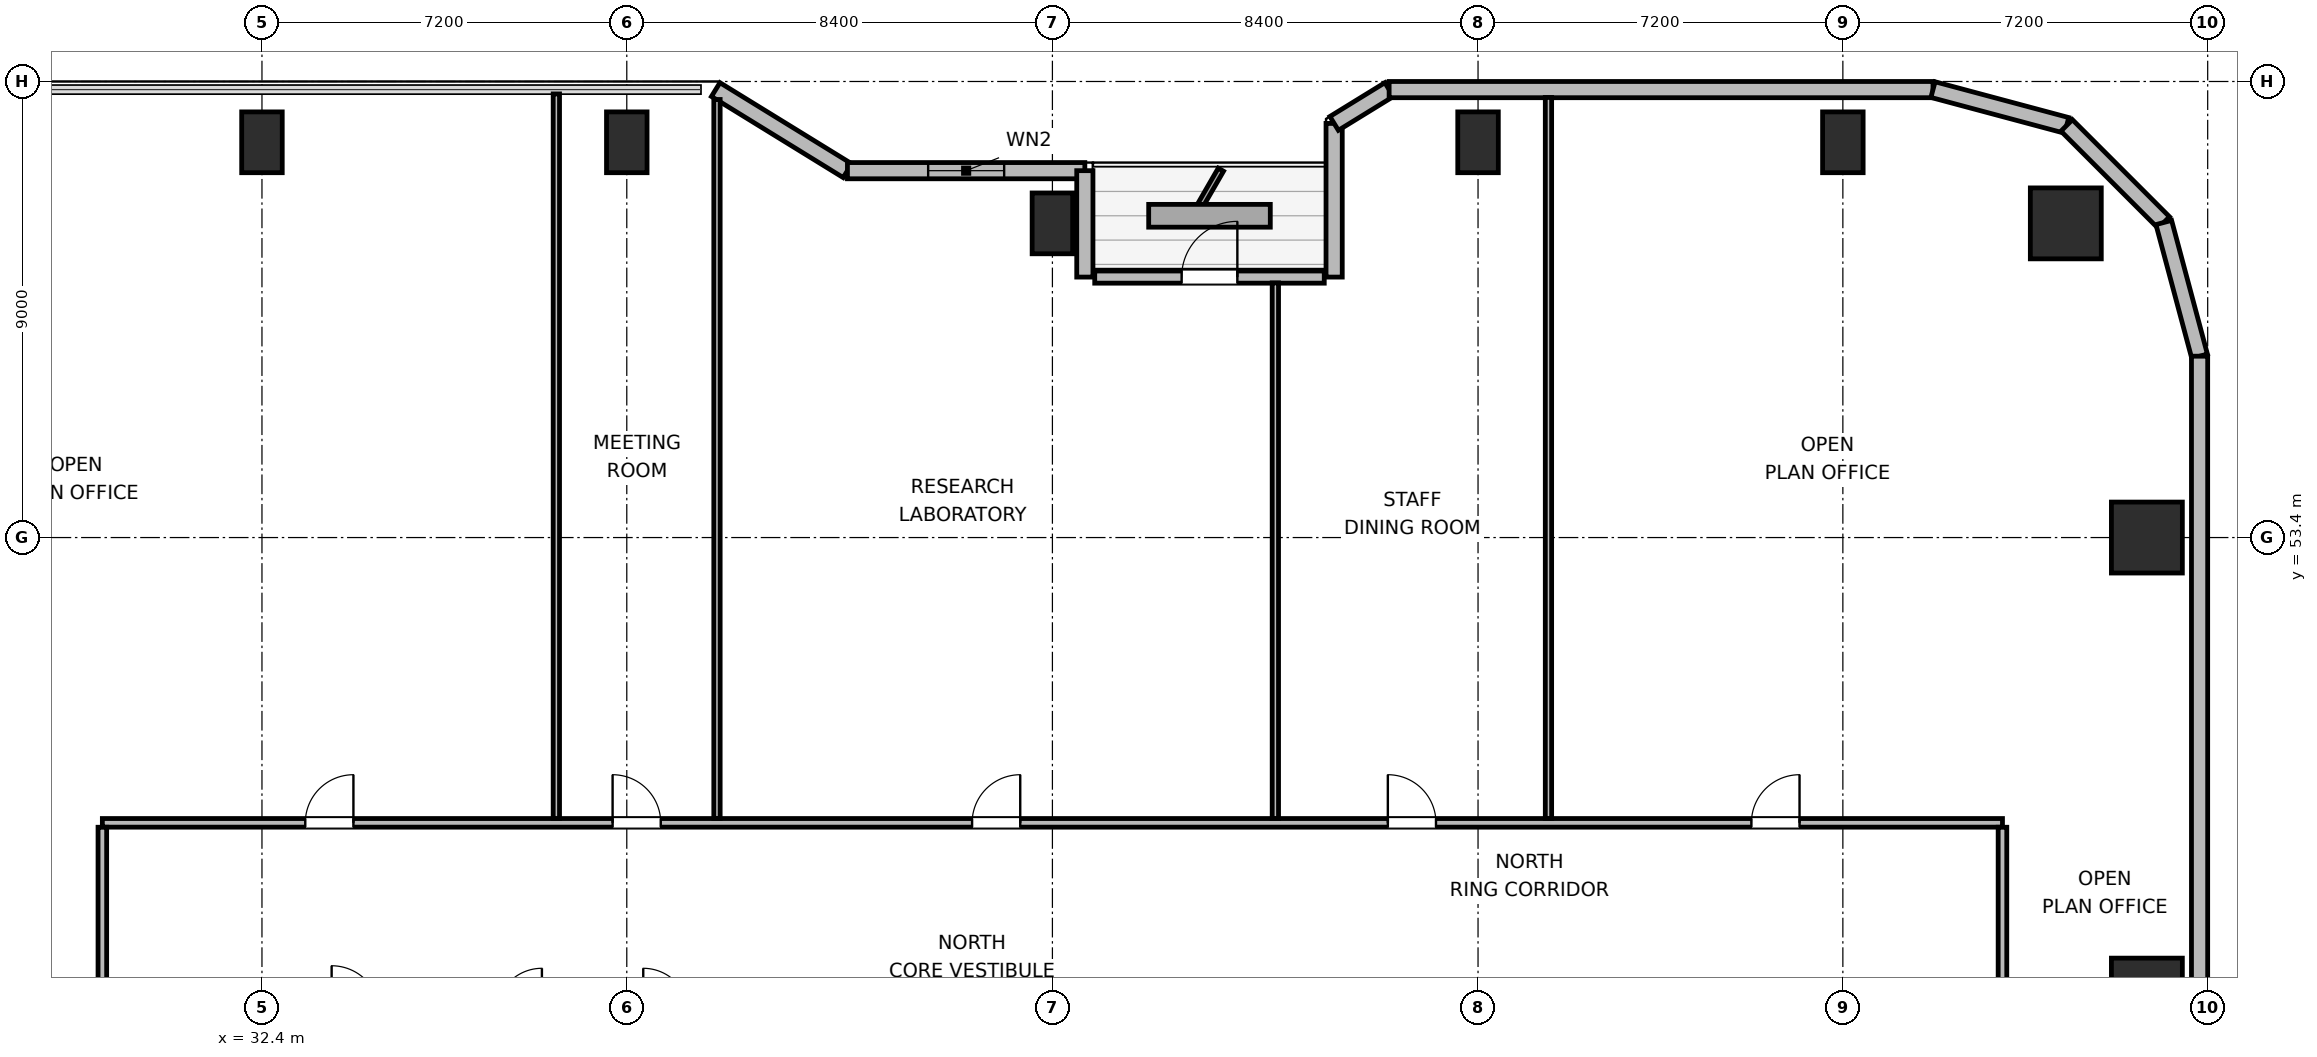
"""IFC4 building model, lengths in metres.
Left out: names, types, materials, properties, quantities, classifications, styles, units other than length and angle.
Written with IfcOpenShell. Run it as: python <this file> out.ifc"""

import sys

from ifc_helpers import new_model, si_unit, direction, frame, frame_2d, origin, origin_2d, place, context, subcontext, project, spatial, rectangle, circle, extrude, element, fill, save


model = new_model("IFC4")
c1 = context("Model", 3, precision=1e-05, world=origin(), true_north=direction((0.0, 1.0)))
c2 = subcontext(c1, "Body", "Model", "MODEL_VIEW")
j1 = project(units=[si_unit("LENGTHUNIT", "METRE"), si_unit("PLANEANGLEUNIT", "RADIAN")], contexts=[c1])
p1 = place(None, origin())
s1 = spatial("IfcSite", under=j1, at=p1, CompositionType="ELEMENT")
p2 = place(p1, origin())
s2 = spatial("IfcBuilding", under=s1, at=p2, CompositionType="ELEMENT")
p3 = place(p2, frame((0.0, 0.0, 93.6)))
s3 = spatial("IfcBuildingStorey", under=s2, at=p3, CompositionType="ELEMENT", Elevation=93.6)
p4 = place(p3, frame((68.0, 59.6, 0.0), z_axis=(0.0, 0.0, 1.0), x_axis=(1.0, 0.0, 0.0)))
e1 = element("IfcColumn", 1, at=p4, inside=s3, PredefinedType="COLUMN", context=c2, shape_type="SweptSolid", body=[
    extrude(circle(Radius=0.7, at=origin_2d()), origin(), (0.0, 0.0, 1.0), 3.9),
])
for number, where, z_axis, x_axis in (
    (2, (32.4, 61.2, 0.0), (0.0, 0.0, 1.0), (1.0, 0.0, 0.0)),
    (3, (39.6, 61.2, 0.0), (0.0, 0.0, 1.0), (1.0, 0.0, 0.0)),
    (4, (48.0, 59.6, 0.0), (0.0, 0.0, 1.0), (1.0, 0.0, 0.0)),
    (5, (56.4, 61.2, 0.0), (0.0, 0.0, 1.0), (1.0, 0.0, 0.0)),
    (6, (63.6, 61.2, 0.0), (0.0, 0.0, 1.0), (1.0, 0.0, 0.0)),
):
    element("IfcColumn", number, at=place(p3, frame(where, z_axis=z_axis, x_axis=x_axis)), inside=s3, PredefinedType="COLUMN", context=c2, shape_type="SweptSolid", body=[
        extrude(rectangle(XDim=0.8, YDim=1.2, at=origin_2d()), origin(), (0.0, 0.0, 1.0), 3.9),
    ])
for number, where, z_axis, x_axis in (
    (7, (69.6, 44.4, 0.0), (0.0, 0.0, 1.0), (1.0, 0.0, 0.0)),
    (8, (69.6, 53.4, 0.0), (0.0, 0.0, 1.0), (1.0, 0.0, 0.0)),
):
    element("IfcColumn", number, at=place(p3, frame(where, z_axis=z_axis, x_axis=x_axis)), inside=s3, PredefinedType="COLUMN", context=c2, shape_type="SweptSolid", body=[
        extrude(rectangle(XDim=1.4, YDim=1.4, at=origin_2d()), origin(), (0.0, 0.0, 1.0), 3.9),
    ])
p5 = place(p3, frame((41.355, 62.24, 0.0), z_axis=(0.0, 0.0, 1.0), x_axis=(0.851630857047, -0.524142044989, 0.0)))
e9 = element("IfcWall", 9, at=p5, inside=s3, PredefinedType="SOLIDWALL", context=c2, shape_type="SweptSolid", body=[
    extrude(rectangle(XDim=3.053, YDim=0.32, at=frame_2d((1.526, 0.0))), origin(), (0.0, 0.0, 1.0), 2.875),
])
p6 = place(p3, frame((43.955, 60.64, 0.0), z_axis=(0.0, 0.0, 1.0), x_axis=(1.0, 0.0, 0.0)))
e10 = element("IfcWall", 10, at=p6, inside=s3, PredefinedType="SOLIDWALL", context=c2, shape_type="SweptSolid", body=[
    extrude(rectangle(XDim=4.685, YDim=0.32, at=frame_2d((2.343, 0.0))), origin(), (0.0, 0.0, 1.0), 2.875),
])
p7 = place(p6, frame((1.593, 0.0, 0.85)))
e11 = element("IfcOpeningElement", 11, at=p7, cuts=e10, PredefinedType="OPENING", context=c2, shape_type="SweptSolid", body=[
    extrude(rectangle(XDim=1.5, YDim=1.1, at=frame_2d((0.75, 0.55))), frame((0.0, 0.17, 0.0), z_axis=(0.0, -1.0, 0.0), x_axis=(1.0, 0.0, 0.0)), (0.0, 0.0, 1.0), 0.34),
])
p8 = place(p3, frame((48.64, 60.64, 0.0), z_axis=(0.0, 0.0, 1.0), x_axis=(0.0, -1.0, 0.0)))
e12 = element("IfcWall", 12, at=p8, inside=s3, PredefinedType="SOLIDWALL", context=c2, shape_type="SweptSolid", body=[
    extrude(rectangle(XDim=2.1, YDim=0.32, at=frame_2d((1.05, 0.0))), origin(), (0.0, 0.0, 1.0), 2.875),
])
p9 = place(p3, frame((48.835, 58.54, 0.0), z_axis=(0.0, 0.0, 1.0), x_axis=(1.0, 0.0, 0.0)))
e13 = element("IfcWall", 13, at=p9, inside=s3, PredefinedType="SOLIDWALL", context=c2, shape_type="SweptSolid", body=[
    extrude(rectangle(XDim=4.53, YDim=0.24, at=frame_2d((2.265, 0.0))), origin(), (0.0, 0.0, 1.0), 3.64),
])
p10 = place(p9, frame((1.715, 0.0, 0.0)))
e14 = element("IfcOpeningElement", 14, at=p10, cuts=e13, PredefinedType="OPENING", context=c2, shape_type="SweptSolid", body=[
    extrude(rectangle(XDim=1.1, YDim=2.04, at=frame_2d((0.55, 1.02))), frame((0.0, 0.13, 0.0), z_axis=(0.0, -1.0, 0.0), x_axis=(1.0, 0.0, 0.0)), (0.0, 0.0, 1.0), 0.26),
])
p11 = place(p3, frame((53.56, 58.54, 0.0), z_axis=(0.0, 0.0, 1.0), x_axis=(0.0, 1.0, 0.0)))
e15 = element("IfcWall", 15, at=p11, inside=s3, PredefinedType="SOLIDWALL", context=c2, shape_type="SweptSolid", body=[
    extrude(rectangle(XDim=3.032, YDim=0.32, at=frame_2d((1.516, 0.0))), origin(), (0.0, 0.0, 1.0), 2.875),
])
p12 = place(p3, frame((53.56, 61.573, 0.0), z_axis=(0.0, 0.0, 1.0), x_axis=(0.851776724646, 0.523904964045, 0.0)))
e16 = element("IfcWall", 16, at=p12, inside=s3, PredefinedType="SOLIDWALL", context=c2, shape_type="SweptSolid", body=[
    extrude(rectangle(XDim=1.274, YDim=0.32, at=frame_2d((0.637, 0.0))), origin(), (0.0, 0.0, 1.0), 3.64),
])
p13 = place(p3, frame((54.645, 62.24, 0.0), z_axis=(0.0, 0.0, 1.0), x_axis=(1.0, 0.0, 0.0)))
e17 = element("IfcWall", 17, at=p13, inside=s3, PredefinedType="SOLIDWALL", context=c2, shape_type="SweptSolid", body=[
    extrude(rectangle(XDim=10.734, YDim=0.32, at=frame_2d((5.367, 0.0))), origin(), (0.0, 0.0, 1.0), 3.64),
])
p14 = place(p3, frame((65.379, 62.24, 0.0), z_axis=(0.0, 0.0, 1.0), x_axis=(0.965958423373, -0.25869736047, 0.0)))
e18 = element("IfcWall", 18, at=p14, inside=s3, PredefinedType="SOLIDWALL", context=c2, shape_type="SweptSolid", body=[
    extrude(rectangle(XDim=2.731, YDim=0.32, at=frame_2d((1.366, 0.0))), origin(), (0.0, 0.0, 1.0), 3.64),
])
p15 = place(p3, frame((68.017, 61.533, 0.0), z_axis=(0.0, 0.0, 1.0), x_axis=(0.707151821269, -0.707061738235, 0.0)))
e19 = element("IfcWall", 19, at=p15, inside=s3, PredefinedType="SOLIDWALL", context=c2, shape_type="SweptSolid", body=[
    extrude(rectangle(XDim=2.71, YDim=0.32, at=frame_2d((1.355, 0.0))), origin(), (0.0, 0.0, 1.0), 3.64),
])
p16 = place(p3, frame((69.934, 59.617, 0.0), z_axis=(0.0, 0.0, 1.0), x_axis=(0.258613949072, -0.965980758269, 0.0)))
e20 = element("IfcWall", 20, at=p16, inside=s3, PredefinedType="SOLIDWALL", context=c2, shape_type="SweptSolid", body=[
    extrude(rectangle(XDim=2.731, YDim=0.32, at=frame_2d((1.366, 0.0))), origin(), (0.0, 0.0, 1.0), 3.64),
])
p17 = place(p3, frame((70.64, 56.979, 0.0), z_axis=(0.0, 0.0, 1.0), x_axis=(0.0, -1.0, 0.0)))
e21 = element("IfcWall", 21, at=p17, inside=s3, PredefinedType="SOLIDWALL", context=c2, shape_type="SweptSolid", body=[
    extrude(rectangle(XDim=14.219, YDim=0.32, at=frame_2d((7.109, 0.0))), origin(), (0.0, 0.0, 1.0), 3.64),
])
p18 = place(p3, frame((29.25, 47.77, 0.0), z_axis=(0.0, 0.0, 1.0), x_axis=(1.0, 0.0, 0.0)))
e22 = element("IfcWall", 22, at=p18, inside=s3, PredefinedType="PARTITIONING", context=c2, shape_type="SweptSolid", body=[
    extrude(rectangle(XDim=37.5, YDim=0.17, at=frame_2d((18.75, 0.0))), origin(), (0.0, 0.0, 1.0), 3.64),
])
p19 = place(p18, frame((4.005, 0.0, 0.0)))
e23 = element("IfcOpeningElement", 23, at=p19, cuts=e22, PredefinedType="OPENING", context=c2, shape_type="SweptSolid", body=[
    extrude(rectangle(XDim=0.95, YDim=2.04, at=frame_2d((0.475, 1.02))), frame((0.0, 0.095, 0.0), z_axis=(0.0, -1.0, 0.0), x_axis=(1.0, 0.0, 0.0)), (0.0, 0.0, 1.0), 0.19),
])
p20 = place(p18, frame((10.07, 0.0, 0.0)))
e24 = element("IfcOpeningElement", 24, at=p20, cuts=e22, PredefinedType="OPENING", context=c2, shape_type="SweptSolid", body=[
    extrude(rectangle(XDim=0.95, YDim=2.04, at=frame_2d((0.475, 1.02))), frame((0.0, 0.095, 0.0), z_axis=(0.0, -1.0, 0.0), x_axis=(1.0, 0.0, 0.0)), (0.0, 0.0, 1.0), 0.19),
])
p21 = place(p18, frame((17.165, 0.0, 0.0)))
e25 = element("IfcOpeningElement", 25, at=p21, cuts=e22, PredefinedType="OPENING", context=c2, shape_type="SweptSolid", body=[
    extrude(rectangle(XDim=0.95, YDim=2.04, at=frame_2d((0.475, 1.02))), frame((0.0, 0.095, 0.0), z_axis=(0.0, -1.0, 0.0), x_axis=(1.0, 0.0, 0.0)), (0.0, 0.0, 1.0), 0.19),
])
p22 = place(p18, frame((25.37, 0.0, 0.0)))
e26 = element("IfcOpeningElement", 26, at=p22, cuts=e22, PredefinedType="OPENING", context=c2, shape_type="SweptSolid", body=[
    extrude(rectangle(XDim=0.95, YDim=2.04, at=frame_2d((0.475, 1.02))), frame((0.0, 0.095, 0.0), z_axis=(0.0, -1.0, 0.0), x_axis=(1.0, 0.0, 0.0)), (0.0, 0.0, 1.0), 0.19),
])
p23 = place(p18, frame((32.545, 0.0, 0.0)))
e27 = element("IfcOpeningElement", 27, at=p23, cuts=e22, PredefinedType="OPENING", context=c2, shape_type="SweptSolid", body=[
    extrude(rectangle(XDim=0.95, YDim=2.04, at=frame_2d((0.475, 1.02))), frame((0.0, 0.095, 0.0), z_axis=(0.0, -1.0, 0.0), x_axis=(1.0, 0.0, 0.0)), (0.0, 0.0, 1.0), 0.19),
])
p24 = place(p3, frame((29.25, 24.317, 0.0), z_axis=(0.0, 0.0, 1.0), x_axis=(0.0, 1.0, 0.0)))
e28 = element("IfcWall", 28, at=p24, inside=s3, PredefinedType="PARTITIONING", context=c2, shape_type="SweptSolid", body=[
    extrude(rectangle(XDim=23.366, YDim=0.17, at=frame_2d((11.683, 0.0))), origin(), (0.0, 0.0, 1.0), 3.64),
])
p25 = place(p24, frame((4.023, 0.0, 0.0)))
e29 = element("IfcOpeningElement", 29, at=p25, cuts=e28, PredefinedType="OPENING", context=c2, shape_type="SweptSolid", body=[
    extrude(rectangle(XDim=0.95, YDim=2.04, at=frame_2d((0.475, 1.02))), frame((0.0, 0.095, 0.0), z_axis=(0.0, -1.0, 0.0), x_axis=(1.0, 0.0, 0.0)), (0.0, 0.0, 1.0), 0.19),
])
p26 = place(p24, frame((11.808, 0.0, 0.0)))
e30 = element("IfcOpeningElement", 30, at=p26, cuts=e28, PredefinedType="OPENING", context=c2, shape_type="SweptSolid", body=[
    extrude(rectangle(XDim=0.95, YDim=2.04, at=frame_2d((0.475, 1.02))), frame((0.0, 0.095, 0.0), z_axis=(0.0, -1.0, 0.0), x_axis=(1.0, 0.0, 0.0)), (0.0, 0.0, 1.0), 0.19),
])
p27 = place(p24, frame((18.993, 0.0, 0.0)))
e31 = element("IfcOpeningElement", 31, at=p27, cuts=e28, PredefinedType="OPENING", context=c2, shape_type="SweptSolid", body=[
    extrude(rectangle(XDim=0.95, YDim=2.04, at=frame_2d((0.475, 1.02))), frame((0.0, 0.095, 0.0), z_axis=(0.0, -1.0, 0.0), x_axis=(1.0, 0.0, 0.0)), (0.0, 0.0, 1.0), 0.19),
])
p28 = place(p3, frame((66.75, 24.317, 0.0), z_axis=(0.0, 0.0, 1.0), x_axis=(0.0, 1.0, 0.0)))
e32 = element("IfcWall", 32, at=p28, inside=s3, PredefinedType="PARTITIONING", context=c2, shape_type="SweptSolid", body=[
    extrude(rectangle(XDim=23.366, YDim=0.17, at=frame_2d((11.683, 0.0))), origin(), (0.0, 0.0, 1.0), 3.64),
])
p29 = place(p28, frame((4.823, 0.0, 0.0)))
e33 = element("IfcOpeningElement", 33, at=p29, cuts=e32, PredefinedType="OPENING", context=c2, shape_type="SweptSolid", body=[
    extrude(rectangle(XDim=0.95, YDim=2.04, at=frame_2d((0.475, 1.02))), frame((0.0, 0.095, 0.0), z_axis=(0.0, -1.0, 0.0), x_axis=(1.0, 0.0, 0.0)), (0.0, 0.0, 1.0), 0.19),
])
p30 = place(p28, frame((16.593, 0.0, 0.0)))
e34 = element("IfcOpeningElement", 34, at=p30, cuts=e32, PredefinedType="OPENING", context=c2, shape_type="SweptSolid", body=[
    extrude(rectangle(XDim=0.95, YDim=2.04, at=frame_2d((0.475, 1.02))), frame((0.0, 0.095, 0.0), z_axis=(0.0, -1.0, 0.0), x_axis=(1.0, 0.0, 0.0)), (0.0, 0.0, 1.0), 0.19),
])
p31 = place(p3, frame((38.21, 47.857, 0.0), z_axis=(0.0, 0.0, 1.0), x_axis=(0.0, 1.0, 0.0)))
e35 = element("IfcWall", 35, at=p31, inside=s3, PredefinedType="PARTITIONING", context=c2, shape_type="SweptSolid", body=[
    extrude(rectangle(XDim=14.298, YDim=0.125, at=frame_2d((7.149, 0.0))), origin(), (0.0, 0.0, 1.0), 3.64),
])
p32 = place(p3, frame((41.38, 47.857, 0.0), z_axis=(0.0, 0.0, 1.0), x_axis=(0.0, 1.0, 0.0)))
e36 = element("IfcWall", 36, at=p32, inside=s3, PredefinedType="PARTITIONING", context=c2, shape_type="SweptSolid", body=[
    extrude(rectangle(XDim=14.188, YDim=0.125, at=frame_2d((7.094, 0.0))), origin(), (0.0, 0.0, 1.0), 3.003),
])
p33 = place(p3, frame((52.4, 47.857, 0.0), z_axis=(0.0, 0.0, 1.0), x_axis=(0.0, 1.0, 0.0)))
e37 = element("IfcWall", 37, at=p33, inside=s3, PredefinedType="PARTITIONING", context=c2, shape_type="SweptSolid", body=[
    extrude(rectangle(XDim=10.568, YDim=0.125, at=frame_2d((5.284, 0.0))), origin(), (0.0, 0.0, 1.0), 3.003),
])
p34 = place(p3, frame((57.79, 47.857, 0.0), z_axis=(0.0, 0.0, 1.0), x_axis=(0.0, 1.0, 0.0)))
e38 = element("IfcWall", 38, at=p34, inside=s3, PredefinedType="PARTITIONING", context=c2, shape_type="SweptSolid", body=[
    extrude(rectangle(XDim=14.228, YDim=0.125, at=frame_2d((7.114, 0.0))), origin(), (0.0, 0.0, 1.0), 3.64),
])
p35 = place(p7, origin())
e39 = element("IfcWindow", 39, at=p35, inside=s3, PartitioningType="SINGLE_PANEL", PredefinedType="WINDOW", context=c2, shape_type="SweptSolid", body=[
    extrude(rectangle(XDim=1.5, YDim=1.1, at=frame_2d((0.75, 0.55))), frame((0.0, 0.03, 0.0), z_axis=(0.0, -1.0, 0.0), x_axis=(1.0, 0.0, 0.0)), (0.0, 0.0, 1.0), 0.06),
])
fill(e11, e39)
p36 = place(p10, origin())
e40 = element("IfcDoor", 40, at=p36, inside=s3, OperationType="SINGLE_SWING_RIGHT", PredefinedType="DOOR", context=c2, shape_type="SweptSolid", body=[
    extrude(rectangle(XDim=1.1, YDim=2.04, at=frame_2d((0.55, 1.02))), frame((0.0, 0.025, 0.0), z_axis=(0.0, -1.0, 0.0), x_axis=(1.0, 0.0, 0.0)), (0.0, 0.0, 1.0), 0.05),
])
fill(e14, e40)
p37 = place(p19, origin())
e41 = element("IfcDoor", 41, at=p37, inside=s3, OperationType="SINGLE_SWING_RIGHT", PredefinedType="DOOR", context=c2, shape_type="SweptSolid", body=[
    extrude(rectangle(XDim=0.95, YDim=2.04, at=frame_2d((0.475, 1.02))), frame((0.0, 0.025, 0.0), z_axis=(0.0, -1.0, 0.0), x_axis=(1.0, 0.0, 0.0)), (0.0, 0.0, 1.0), 0.05),
])
fill(e23, e41)
p38 = place(p20, origin())
e42 = element("IfcDoor", 42, at=p38, inside=s3, OperationType="SINGLE_SWING_LEFT", PredefinedType="DOOR", context=c2, shape_type="SweptSolid", body=[
    extrude(rectangle(XDim=0.95, YDim=2.04, at=frame_2d((0.475, 1.02))), frame((0.0, 0.025, 0.0), z_axis=(0.0, -1.0, 0.0), x_axis=(1.0, 0.0, 0.0)), (0.0, 0.0, 1.0), 0.05),
])
fill(e24, e42)
p39 = place(p21, origin())
e43 = element("IfcDoor", 43, at=p39, inside=s3, OperationType="SINGLE_SWING_RIGHT", PredefinedType="DOOR", context=c2, shape_type="SweptSolid", body=[
    extrude(rectangle(XDim=0.95, YDim=2.04, at=frame_2d((0.475, 1.02))), frame((0.0, 0.025, 0.0), z_axis=(0.0, -1.0, 0.0), x_axis=(1.0, 0.0, 0.0)), (0.0, 0.0, 1.0), 0.05),
])
fill(e25, e43)
p40 = place(p22, origin())
e44 = element("IfcDoor", 44, at=p40, inside=s3, OperationType="SINGLE_SWING_LEFT", PredefinedType="DOOR", context=c2, shape_type="SweptSolid", body=[
    extrude(rectangle(XDim=0.95, YDim=2.04, at=frame_2d((0.475, 1.02))), frame((0.0, 0.025, 0.0), z_axis=(0.0, -1.0, 0.0), x_axis=(1.0, 0.0, 0.0)), (0.0, 0.0, 1.0), 0.05),
])
fill(e26, e44)
p41 = place(p23, origin())
e45 = element("IfcDoor", 45, at=p41, inside=s3, OperationType="SINGLE_SWING_RIGHT", PredefinedType="DOOR", context=c2, shape_type="SweptSolid", body=[
    extrude(rectangle(XDim=0.95, YDim=2.04, at=frame_2d((0.475, 1.02))), frame((0.0, 0.025, 0.0), z_axis=(0.0, -1.0, 0.0), x_axis=(1.0, 0.0, 0.0)), (0.0, 0.0, 1.0), 0.05),
])
fill(e27, e45)
save(model, sys.argv[1])
